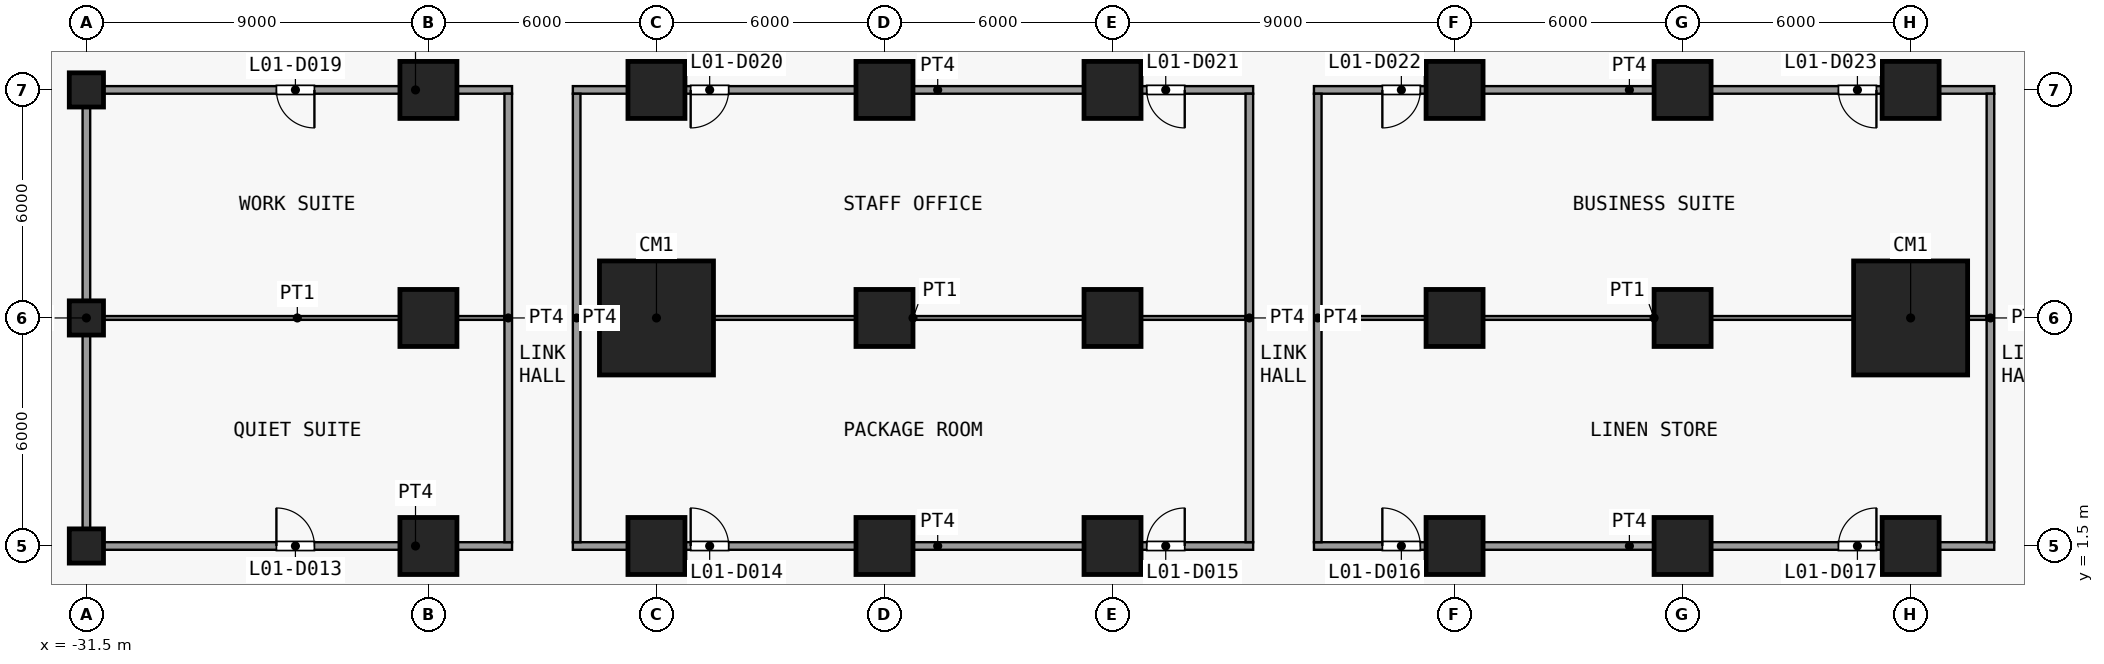
"""IFC4 building model, lengths in metres.
Left out: names, types, materials, properties, quantities, classifications, styles, units other than length and angle.
Written with IfcOpenShell. Run it as: python <this file> out.ifc"""

import sys

from ifc_helpers import new_model, si_unit, direction, frame, frame_2d, origin, origin_2d, place, context, subcontext, project, spatial, rectangle, extrude, element, fill, save


model = new_model("IFC4")
c1 = context("Model", 3, precision=1e-05, world=origin(), true_north=direction((0.0, 1.0)))
c2 = subcontext(c1, "Body", "Model", "MODEL_VIEW")
j1 = project(units=[si_unit("LENGTHUNIT", "METRE"), si_unit("PLANEANGLEUNIT", "RADIAN")], contexts=[c1])
p1 = place(None, origin())
s1 = spatial("IfcSite", under=j1, at=p1, CompositionType="ELEMENT")
p2 = place(p1, origin())
s2 = spatial("IfcBuilding", under=s1, at=p2, CompositionType="ELEMENT")
p3 = place(p2, frame((0.0, 0.0, 8.0)))
s3 = spatial("IfcBuildingStorey", under=s2, at=p3, CompositionType="ELEMENT", Elevation=8.0)
for number, where, z_axis, x_axis in (
    (1, (-31.5, 1.5, 0.0), (0.0, 0.0, 1.0), (1.0, 0.0, 0.0)),
    (2, (-31.5, 7.5, 0.0), (0.0, 0.0, 1.0), (1.0, 0.0, 0.0)),
    (3, (-31.5, 13.5, 0.0), (0.0, 0.0, 1.0), (1.0, 0.0, 0.0)),
):
    element("IfcColumn", number, at=place(p3, frame(where, z_axis=z_axis, x_axis=x_axis)), inside=s3, PredefinedType="COLUMN", context=c2, shape_type="SweptSolid", body=[
        extrude(rectangle(XDim=0.9, YDim=0.9, at=origin_2d()), origin(), (0.0, 0.0, 1.0), 5.5),
    ])
for number, where, z_axis, x_axis in (
    (4, (-22.5, 1.5, 0.0), (0.0, 0.0, 1.0), (1.0, 0.0, 0.0)),
    (5, (-22.5, 7.5, 0.0), (0.0, 0.0, 1.0), (1.0, 0.0, 0.0)),
    (6, (-22.5, 13.5, 0.0), (0.0, 0.0, 1.0), (1.0, 0.0, 0.0)),
    (7, (-16.5, 1.5, 0.0), (0.0, 0.0, 1.0), (1.0, 0.0, 0.0)),
):
    element("IfcColumn", number, at=place(p3, frame(where, z_axis=z_axis, x_axis=x_axis)), inside=s3, PredefinedType="COLUMN", context=c2, shape_type="SweptSolid", body=[
        extrude(rectangle(XDim=1.5, YDim=1.5, at=origin_2d()), origin(), (0.0, 0.0, 1.0), 5.5),
    ])
p4 = place(p3, frame((-16.5, 7.5, 0.0), z_axis=(0.0, 0.0, 1.0), x_axis=(1.0, 0.0, 0.0)))
e8 = element("IfcColumn", 8, at=p4, inside=s3, PredefinedType="COLUMN", context=c2, shape_type="SweptSolid", body=[
    extrude(rectangle(XDim=3.0, YDim=3.0, at=origin_2d()), origin(), (0.0, 0.0, 1.0), 5.5),
])
for number, where, z_axis, x_axis in (
    (9, (-16.5, 13.5, 0.0), (0.0, 0.0, 1.0), (1.0, 0.0, 0.0)),
    (10, (-10.5, 1.5, 0.0), (0.0, 0.0, 1.0), (1.0, 0.0, 0.0)),
    (11, (-10.5, 7.5, 0.0), (0.0, 0.0, 1.0), (1.0, 0.0, 0.0)),
    (12, (-10.5, 13.5, 0.0), (0.0, 0.0, 1.0), (1.0, 0.0, 0.0)),
    (13, (-4.5, 1.5, 0.0), (0.0, 0.0, 1.0), (1.0, 0.0, 0.0)),
    (14, (-4.5, 7.5, 0.0), (0.0, 0.0, 1.0), (1.0, 0.0, 0.0)),
    (15, (-4.5, 13.5, 0.0), (0.0, 0.0, 1.0), (1.0, 0.0, 0.0)),
    (16, (4.5, 1.5, 0.0), (0.0, 0.0, 1.0), (1.0, 0.0, 0.0)),
    (17, (4.5, 7.5, 0.0), (0.0, 0.0, 1.0), (1.0, 0.0, 0.0)),
    (18, (4.5, 13.5, 0.0), (0.0, 0.0, 1.0), (1.0, 0.0, 0.0)),
    (19, (10.5, 1.5, 0.0), (0.0, 0.0, 1.0), (1.0, 0.0, 0.0)),
    (20, (10.5, 7.5, 0.0), (0.0, 0.0, 1.0), (1.0, 0.0, 0.0)),
    (21, (10.5, 13.5, 0.0), (0.0, 0.0, 1.0), (1.0, 0.0, 0.0)),
    (22, (16.5, 1.5, 0.0), (0.0, 0.0, 1.0), (1.0, 0.0, 0.0)),
):
    element("IfcColumn", number, at=place(p3, frame(where, z_axis=z_axis, x_axis=x_axis)), inside=s3, PredefinedType="COLUMN", context=c2, shape_type="SweptSolid", body=[
        extrude(rectangle(XDim=1.5, YDim=1.5, at=origin_2d()), origin(), (0.0, 0.0, 1.0), 5.5),
    ])
p5 = place(p3, frame((16.5, 7.5, 0.0), z_axis=(0.0, 0.0, 1.0), x_axis=(1.0, 0.0, 0.0)))
e23 = element("IfcColumn", 23, at=p5, inside=s3, PredefinedType="COLUMN", context=c2, shape_type="SweptSolid", body=[
    extrude(rectangle(XDim=3.0, YDim=3.0, at=origin_2d()), origin(), (0.0, 0.0, 1.0), 5.5),
])
p6 = place(p3, frame((16.5, 13.5, 0.0), z_axis=(0.0, 0.0, 1.0), x_axis=(1.0, 0.0, 0.0)))
e24 = element("IfcColumn", 24, at=p6, inside=s3, PredefinedType="COLUMN", context=c2, shape_type="SweptSolid", body=[
    extrude(rectangle(XDim=1.5, YDim=1.5, at=origin_2d()), origin(), (0.0, 0.0, 1.0), 5.5),
])
p7 = place(p3, frame((-31.6, 1.5, 0.0), z_axis=(0.0, 0.0, 1.0), x_axis=(1.0, 0.0, 0.0)))
e25 = element("IfcWall", 25, at=p7, inside=s3, PredefinedType="PARTITIONING", context=c2, shape_type="SweptSolid", body=[
    extrude(rectangle(XDim=11.3, YDim=0.2, at=frame_2d((5.65, 0.0))), origin(), (0.0, 0.0, 1.0), 5.15),
])
p8 = place(p7, frame((5.1, 0.0, 0.0)))
e26 = element("IfcOpeningElement", 26, at=p8, cuts=e25, PredefinedType="OPENING", context=c2, shape_type="SweptSolid", body=[
    extrude(rectangle(XDim=1.0, YDim=2.1, at=frame_2d((0.5, 1.05))), frame((0.0, 0.11, 0.0), z_axis=(0.0, -1.0, 0.0), x_axis=(1.0, 0.0, 0.0)), (0.0, 0.0, 1.0), 0.22),
])
p9 = place(p3, frame((-18.7, 1.5, 0.0), z_axis=(0.0, 0.0, 1.0), x_axis=(1.0, 0.0, 0.0)))
e27 = element("IfcWall", 27, at=p9, inside=s3, PredefinedType="PARTITIONING", context=c2, shape_type="SweptSolid", body=[
    extrude(rectangle(XDim=17.9, YDim=0.2, at=frame_2d((8.95, 0.0))), origin(), (0.0, 0.0, 1.0), 5.15),
])
p10 = place(p9, frame((3.1, 0.0, 0.0)))
e28 = element("IfcOpeningElement", 28, at=p10, cuts=e27, PredefinedType="OPENING", context=c2, shape_type="SweptSolid", body=[
    extrude(rectangle(XDim=1.0, YDim=2.1, at=frame_2d((0.5, 1.05))), frame((0.0, 0.11, 0.0), z_axis=(0.0, -1.0, 0.0), x_axis=(1.0, 0.0, 0.0)), (0.0, 0.0, 1.0), 0.22),
])
p11 = place(p9, frame((15.1, 0.0, 0.0)))
e29 = element("IfcOpeningElement", 29, at=p11, cuts=e27, PredefinedType="OPENING", context=c2, shape_type="SweptSolid", body=[
    extrude(rectangle(XDim=1.0, YDim=2.1, at=frame_2d((0.5, 1.05))), frame((0.0, 0.11, 0.0), z_axis=(0.0, -1.0, 0.0), x_axis=(1.0, 0.0, 0.0)), (0.0, 0.0, 1.0), 0.22),
])
p12 = place(p3, frame((0.8, 1.5, 0.0), z_axis=(0.0, 0.0, 1.0), x_axis=(1.0, 0.0, 0.0)))
e30 = element("IfcWall", 30, at=p12, inside=s3, PredefinedType="PARTITIONING", context=c2, shape_type="SweptSolid", body=[
    extrude(rectangle(XDim=17.9, YDim=0.2, at=frame_2d((8.95, 0.0))), origin(), (0.0, 0.0, 1.0), 5.15),
])
p13 = place(p12, frame((1.8, 0.0, 0.0)))
e31 = element("IfcOpeningElement", 31, at=p13, cuts=e30, PredefinedType="OPENING", context=c2, shape_type="SweptSolid", body=[
    extrude(rectangle(XDim=1.0, YDim=2.1, at=frame_2d((0.5, 1.05))), frame((0.0, 0.11, 0.0), z_axis=(0.0, -1.0, 0.0), x_axis=(1.0, 0.0, 0.0)), (0.0, 0.0, 1.0), 0.22),
])
p14 = place(p12, frame((13.8, 0.0, 0.0)))
e32 = element("IfcOpeningElement", 32, at=p14, cuts=e30, PredefinedType="OPENING", context=c2, shape_type="SweptSolid", body=[
    extrude(rectangle(XDim=1.0, YDim=2.1, at=frame_2d((0.5, 1.05))), frame((0.0, 0.11, 0.0), z_axis=(0.0, -1.0, 0.0), x_axis=(1.0, 0.0, 0.0)), (0.0, 0.0, 1.0), 0.22),
])
p15 = place(p3, frame((-31.4, 7.5, 0.0), z_axis=(0.0, 0.0, 1.0), x_axis=(1.0, 0.0, 0.0)))
e33 = element("IfcWall", 33, at=p15, inside=s3, PredefinedType="PARTITIONING", context=c2, shape_type="SweptSolid", body=[
    extrude(rectangle(XDim=10.9, YDim=0.1, at=frame_2d((5.45, 0.0))), origin(), (0.0, 0.0, 1.0), 5.15),
])
for number, where, z_axis, x_axis in (
    (34, (-18.5, 7.5, 0.0), (0.0, 0.0, 1.0), (1.0, 0.0, 0.0)),
    (35, (1.0, 7.5, 0.0), (0.0, 0.0, 1.0), (1.0, 0.0, 0.0)),
):
    element("IfcWall", number, at=place(p3, frame(where, z_axis=z_axis, x_axis=x_axis)), inside=s3, PredefinedType="PARTITIONING", context=c2, shape_type="SweptSolid", body=[
        extrude(rectangle(XDim=17.5, YDim=0.1, at=frame_2d((8.75, 0.0))), origin(), (0.0, 0.0, 1.0), 5.15),
    ])
p16 = place(p3, frame((-31.6, 13.5, 0.0), z_axis=(0.0, 0.0, 1.0), x_axis=(1.0, 0.0, 0.0)))
e36 = element("IfcWall", 36, at=p16, inside=s3, PredefinedType="PARTITIONING", context=c2, shape_type="SweptSolid", body=[
    extrude(rectangle(XDim=11.3, YDim=0.2, at=frame_2d((5.65, 0.0))), origin(), (0.0, 0.0, 1.0), 5.15),
])
p17 = place(p16, frame((5.1, 0.0, 0.0)))
e37 = element("IfcOpeningElement", 37, at=p17, cuts=e36, PredefinedType="OPENING", context=c2, shape_type="SweptSolid", body=[
    extrude(rectangle(XDim=1.0, YDim=2.1, at=frame_2d((0.5, 1.05))), frame((0.0, 0.11, 0.0), z_axis=(0.0, -1.0, 0.0), x_axis=(1.0, 0.0, 0.0)), (0.0, 0.0, 1.0), 0.22),
])
p18 = place(p3, frame((-18.7, 13.5, 0.0), z_axis=(0.0, 0.0, 1.0), x_axis=(1.0, 0.0, 0.0)))
e38 = element("IfcWall", 38, at=p18, inside=s3, PredefinedType="PARTITIONING", context=c2, shape_type="SweptSolid", body=[
    extrude(rectangle(XDim=17.9, YDim=0.2, at=frame_2d((8.95, 0.0))), origin(), (0.0, 0.0, 1.0), 5.15),
])
p19 = place(p18, frame((3.1, 0.0, 0.0)))
e39 = element("IfcOpeningElement", 39, at=p19, cuts=e38, PredefinedType="OPENING", context=c2, shape_type="SweptSolid", body=[
    extrude(rectangle(XDim=1.0, YDim=2.1, at=frame_2d((0.5, 1.05))), frame((0.0, 0.11, 0.0), z_axis=(0.0, -1.0, 0.0), x_axis=(1.0, 0.0, 0.0)), (0.0, 0.0, 1.0), 0.22),
])
p20 = place(p18, frame((15.1, 0.0, 0.0)))
e40 = element("IfcOpeningElement", 40, at=p20, cuts=e38, PredefinedType="OPENING", context=c2, shape_type="SweptSolid", body=[
    extrude(rectangle(XDim=1.0, YDim=2.1, at=frame_2d((0.5, 1.05))), frame((0.0, 0.11, 0.0), z_axis=(0.0, -1.0, 0.0), x_axis=(1.0, 0.0, 0.0)), (0.0, 0.0, 1.0), 0.22),
])
p21 = place(p3, frame((0.8, 13.5, 0.0), z_axis=(0.0, 0.0, 1.0), x_axis=(1.0, 0.0, 0.0)))
e41 = element("IfcWall", 41, at=p21, inside=s3, PredefinedType="PARTITIONING", context=c2, shape_type="SweptSolid", body=[
    extrude(rectangle(XDim=17.9, YDim=0.2, at=frame_2d((8.95, 0.0))), origin(), (0.0, 0.0, 1.0), 5.15),
])
p22 = place(p21, frame((1.8, 0.0, 0.0)))
e42 = element("IfcOpeningElement", 42, at=p22, cuts=e41, PredefinedType="OPENING", context=c2, shape_type="SweptSolid", body=[
    extrude(rectangle(XDim=1.0, YDim=2.1, at=frame_2d((0.5, 1.05))), frame((0.0, 0.11, 0.0), z_axis=(0.0, -1.0, 0.0), x_axis=(1.0, 0.0, 0.0)), (0.0, 0.0, 1.0), 0.22),
])
p23 = place(p21, frame((13.8, 0.0, 0.0)))
e43 = element("IfcOpeningElement", 43, at=p23, cuts=e41, PredefinedType="OPENING", context=c2, shape_type="SweptSolid", body=[
    extrude(rectangle(XDim=1.0, YDim=2.1, at=frame_2d((0.5, 1.05))), frame((0.0, 0.11, 0.0), z_axis=(0.0, -1.0, 0.0), x_axis=(1.0, 0.0, 0.0)), (0.0, 0.0, 1.0), 0.22),
])
for number, where, z_axis, x_axis in (
    (44, (-31.5, 1.6, 0.0), (0.0, 0.0, 1.0), (0.0, 1.0, 0.0)),
    (45, (-20.4, 1.6, 0.0), (0.0, 0.0, 1.0), (0.0, 1.0, 0.0)),
    (46, (-18.6, 1.6, 0.0), (0.0, 0.0, 1.0), (0.0, 1.0, 0.0)),
    (47, (-0.9, 1.6, 0.0), (0.0, 0.0, 1.0), (0.0, 1.0, 0.0)),
    (48, (0.9, 1.6, 0.0), (0.0, 0.0, 1.0), (0.0, 1.0, 0.0)),
    (49, (18.6, 1.6, 0.0), (0.0, 0.0, 1.0), (0.0, 1.0, 0.0)),
):
    element("IfcWall", number, at=place(p3, frame(where, z_axis=z_axis, x_axis=x_axis)), inside=s3, PredefinedType="PARTITIONING", context=c2, shape_type="SweptSolid", body=[
        extrude(rectangle(XDim=11.8, YDim=0.2, at=frame_2d((5.9, 0.0))), origin(), (0.0, 0.0, 1.0), 5.15),
    ])
p24 = place(p8, origin())
e50 = element("IfcDoor", 50, at=p24, inside=s3, OperationType="SINGLE_SWING_RIGHT", PredefinedType="DOOR", context=c2, shape_type="SweptSolid", body=[
    extrude(rectangle(XDim=1.0, YDim=2.1, at=frame_2d((0.5, 1.05))), frame((0.0, 0.025, 0.0), z_axis=(0.0, -1.0, 0.0), x_axis=(1.0, 0.0, 0.0)), (0.0, 0.0, 1.0), 0.05),
])
fill(e26, e50)
p25 = place(p10, origin())
e51 = element("IfcDoor", 51, at=p25, inside=s3, OperationType="SINGLE_SWING_RIGHT", PredefinedType="DOOR", context=c2, shape_type="SweptSolid", body=[
    extrude(rectangle(XDim=1.0, YDim=2.1, at=frame_2d((0.5, 1.05))), frame((0.0, 0.025, 0.0), z_axis=(0.0, -1.0, 0.0), x_axis=(1.0, 0.0, 0.0)), (0.0, 0.0, 1.0), 0.05),
])
fill(e28, e51)
p26 = place(p11, origin())
e52 = element("IfcDoor", 52, at=p26, inside=s3, OperationType="SINGLE_SWING_LEFT", PredefinedType="DOOR", context=c2, shape_type="SweptSolid", body=[
    extrude(rectangle(XDim=1.0, YDim=2.1, at=frame_2d((0.5, 1.05))), frame((0.0, 0.025, 0.0), z_axis=(0.0, -1.0, 0.0), x_axis=(1.0, 0.0, 0.0)), (0.0, 0.0, 1.0), 0.05),
])
fill(e29, e52)
p27 = place(p13, origin())
e53 = element("IfcDoor", 53, at=p27, inside=s3, OperationType="SINGLE_SWING_RIGHT", PredefinedType="DOOR", context=c2, shape_type="SweptSolid", body=[
    extrude(rectangle(XDim=1.0, YDim=2.1, at=frame_2d((0.5, 1.05))), frame((0.0, 0.025, 0.0), z_axis=(0.0, -1.0, 0.0), x_axis=(1.0, 0.0, 0.0)), (0.0, 0.0, 1.0), 0.05),
])
fill(e31, e53)
p28 = place(p14, origin())
e54 = element("IfcDoor", 54, at=p28, inside=s3, OperationType="SINGLE_SWING_LEFT", PredefinedType="DOOR", context=c2, shape_type="SweptSolid", body=[
    extrude(rectangle(XDim=1.0, YDim=2.1, at=frame_2d((0.5, 1.05))), frame((0.0, 0.025, 0.0), z_axis=(0.0, -1.0, 0.0), x_axis=(1.0, 0.0, 0.0)), (0.0, 0.0, 1.0), 0.05),
])
fill(e32, e54)
p29 = place(p17, origin())
e55 = element("IfcDoor", 55, at=p29, inside=s3, OperationType="SINGLE_SWING_RIGHT", PredefinedType="DOOR", context=c2, shape_type="SweptSolid", body=[
    extrude(rectangle(XDim=1.0, YDim=2.1, at=frame_2d((0.5, 1.05))), frame((0.0, 0.025, 0.0), z_axis=(0.0, -1.0, 0.0), x_axis=(1.0, 0.0, 0.0)), (0.0, 0.0, 1.0), 0.05),
])
fill(e37, e55)
p30 = place(p19, origin())
e56 = element("IfcDoor", 56, at=p30, inside=s3, OperationType="SINGLE_SWING_LEFT", PredefinedType="DOOR", context=c2, shape_type="SweptSolid", body=[
    extrude(rectangle(XDim=1.0, YDim=2.1, at=frame_2d((0.5, 1.05))), frame((0.0, 0.025, 0.0), z_axis=(0.0, -1.0, 0.0), x_axis=(1.0, 0.0, 0.0)), (0.0, 0.0, 1.0), 0.05),
])
fill(e39, e56)
p31 = place(p20, origin())
e57 = element("IfcDoor", 57, at=p31, inside=s3, OperationType="SINGLE_SWING_RIGHT", PredefinedType="DOOR", context=c2, shape_type="SweptSolid", body=[
    extrude(rectangle(XDim=1.0, YDim=2.1, at=frame_2d((0.5, 1.05))), frame((0.0, 0.025, 0.0), z_axis=(0.0, -1.0, 0.0), x_axis=(1.0, 0.0, 0.0)), (0.0, 0.0, 1.0), 0.05),
])
fill(e40, e57)
p32 = place(p22, origin())
e58 = element("IfcDoor", 58, at=p32, inside=s3, OperationType="SINGLE_SWING_LEFT", PredefinedType="DOOR", context=c2, shape_type="SweptSolid", body=[
    extrude(rectangle(XDim=1.0, YDim=2.1, at=frame_2d((0.5, 1.05))), frame((0.0, 0.025, 0.0), z_axis=(0.0, -1.0, 0.0), x_axis=(1.0, 0.0, 0.0)), (0.0, 0.0, 1.0), 0.05),
])
fill(e42, e58)
p33 = place(p23, origin())
e59 = element("IfcDoor", 59, at=p33, inside=s3, OperationType="SINGLE_SWING_RIGHT", PredefinedType="DOOR", context=c2, shape_type="SweptSolid", body=[
    extrude(rectangle(XDim=1.0, YDim=2.1, at=frame_2d((0.5, 1.05))), frame((0.0, 0.025, 0.0), z_axis=(0.0, -1.0, 0.0), x_axis=(1.0, 0.0, 0.0)), (0.0, 0.0, 1.0), 0.05),
])
fill(e43, e59)
save(model, sys.argv[1])
